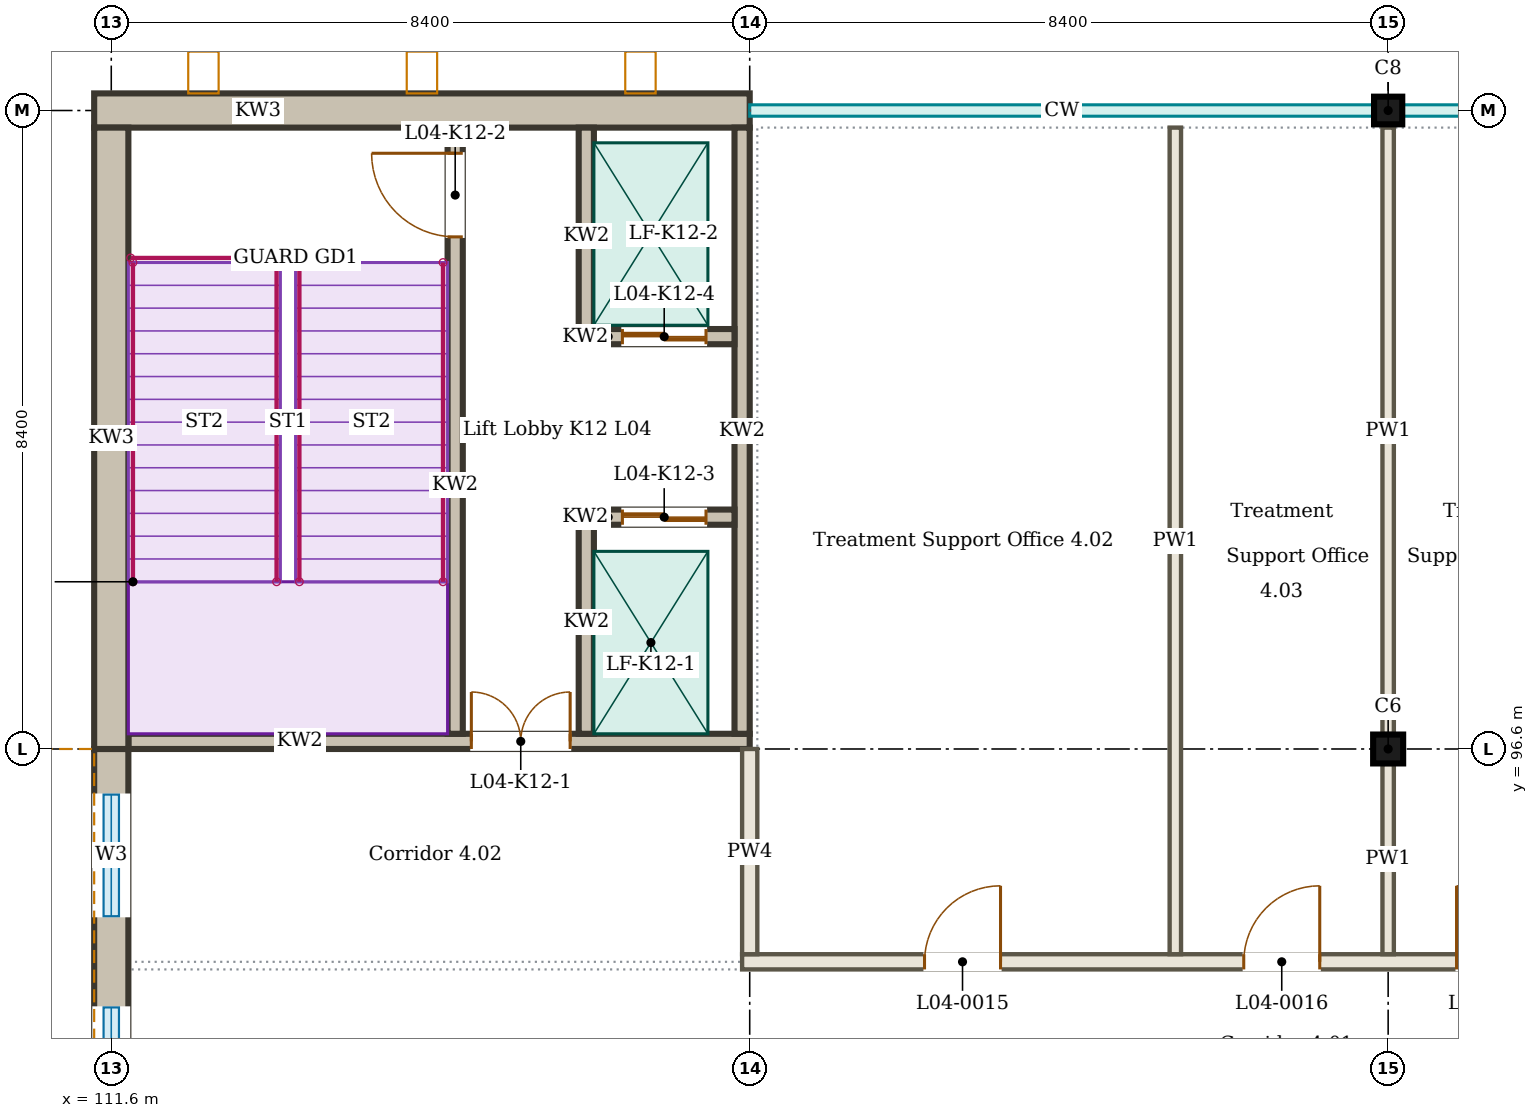
"""IFC4 building model, lengths in metres.
Left out: names, types, materials, properties, quantities, classifications, styles, units other than length and angle.
Written with IfcOpenShell. Run it as: python <this file> out.ifc"""

import sys

from ifc_helpers import new_model, si_unit, direction, frame, frame_2d, origin, origin_2d, place, context, subcontext, project, spatial, rectangle, i_section, extrude, element, fill, save


model = new_model("IFC4")
c1 = context("Model", 3, precision=1e-05, world=origin(), true_north=direction((0.0, 1.0)))
c2 = subcontext(c1, "Body", "Model", "MODEL_VIEW")
j1 = project(units=[si_unit("LENGTHUNIT", "METRE"), si_unit("PLANEANGLEUNIT", "RADIAN")], contexts=[c1])
p1 = place(None, origin())
s1 = spatial("IfcSite", under=j1, at=p1, CompositionType="ELEMENT")
p2 = place(p1, origin())
s2 = spatial("IfcBuilding", under=s1, at=p2, CompositionType="ELEMENT")
p3 = place(p2, frame((0.0, 0.0, 18.0)))
s3 = spatial("IfcBuildingStorey", under=s2, at=p3, CompositionType="ELEMENT", Elevation=18.0)
p4 = place(p3, frame((128.4, 96.6, 0.0), z_axis=(0.0, 0.0, 1.0), x_axis=(1.0, 0.0, 0.0)))
e1 = element("IfcColumn", 1, at=p4, inside=s3, PredefinedType="COLUMN", context=c2, shape_type="SweptSolid", body=[
    extrude(i_section(OverallWidth=0.395, OverallDepth=0.38, WebThickness=0.019, FlangeThickness=0.03, FilletRadius=0.027, at=origin_2d()), origin(), (0.0, 0.0, 1.0), 4.5),
])
p5 = place(p3, frame((128.4, 105.0, 0.0), z_axis=(0.0, 0.0, 1.0), x_axis=(1.0, 0.0, 0.0)))
e2 = element("IfcColumn", 2, at=p5, inside=s3, PredefinedType="COLUMN", context=c2, shape_type="SweptSolid", body=[
    extrude(i_section(OverallWidth=0.371, OverallDepth=0.364, WebThickness=0.013, FlangeThickness=0.022, FilletRadius=0.027, at=origin_2d()), origin(), (0.0, 0.0, 1.0), 4.5),
])
p6 = place(p3, frame((111.6, 88.35, 0.0), z_axis=(0.0, 0.0, 1.0), x_axis=(0.0, 1.0, 0.0)))
e3 = element("IfcWall", 3, at=p6, inside=s3, PredefinedType="SOLIDWALL", context=c2, shape_type="SweptSolid", body=[
    extrude(rectangle(XDim=8.25, YDim=0.45, at=frame_2d((4.125, 0.0))), origin(), (0.0, 0.0, 1.0), 3.8),
])
p7 = place(p6, frame((0.95, 0.0, 2.1)))
e4 = element("IfcOpeningElement", 4, at=p7, cuts=e3, PredefinedType="OPENING", context=c2, shape_type="SweptSolid", body=[
    extrude(rectangle(XDim=0.6, YDim=1.2, at=frame_2d((0.3, 0.6))), frame((0.0, 0.235, 0.0), z_axis=(0.0, -1.0, 0.0), x_axis=(1.0, 0.0, 0.0)), (0.0, 0.0, 1.0), 0.47),
])
p8 = place(p6, frame((3.25, 0.0, 2.7)))
e5 = element("IfcOpeningElement", 5, at=p8, cuts=e3, PredefinedType="OPENING", context=c2, shape_type="SweptSolid", body=[
    extrude(rectangle(XDim=1.6, YDim=0.6, at=frame_2d((0.8, 0.3))), frame((0.0, 0.235, 0.0), z_axis=(0.0, -1.0, 0.0), x_axis=(1.0, 0.0, 0.0)), (0.0, 0.0, 1.0), 0.47),
])
p9 = place(p6, frame((6.05, 0.0, 2.7)))
e6 = element("IfcOpeningElement", 6, at=p9, cuts=e3, PredefinedType="OPENING", context=c2, shape_type="SweptSolid", body=[
    extrude(rectangle(XDim=1.6, YDim=0.6, at=frame_2d((0.8, 0.3))), frame((0.0, 0.235, 0.0), z_axis=(0.0, -1.0, 0.0), x_axis=(1.0, 0.0, 0.0)), (0.0, 0.0, 1.0), 0.47),
])
p10 = place(p3, frame((111.44, 88.35, 3.82), z_axis=(0.0, 0.0, 1.0), x_axis=(0.0, 1.0, 0.0)))
e7 = element("IfcWall", 7, at=p10, inside=s3, PredefinedType="SOLIDWALL", context=c2, shape_type="SweptSolid", body=[
    extrude(rectangle(XDim=8.25, YDim=0.13, at=frame_2d((4.125, 0.0))), origin(), (0.0, 0.0, 1.0), 0.68),
])
p11 = place(p3, frame((119.9, 93.8, 0.0), z_axis=(0.0, 0.0, 1.0), x_axis=(1.0, 0.0, 0.0)))
e8 = element("IfcWall", 8, at=p11, inside=s3, PredefinedType="PARTITIONING", context=c2, shape_type="SweptSolid", body=[
    extrude(rectangle(XDim=22.6, YDim=0.2, at=frame_2d((11.3, 0.0))), origin(), (0.0, 0.0, 1.0), 3.75),
])
p12 = place(p11, frame((2.4, 0.0, 0.0)))
e9 = element("IfcOpeningElement", 9, at=p12, cuts=e8, PredefinedType="OPENING", context=c2, shape_type="SweptSolid", body=[
    extrude(rectangle(XDim=1.0, YDim=2.1, at=frame_2d((0.5, 1.05))), frame((0.0, 0.11, 0.0), z_axis=(0.0, -1.0, 0.0), x_axis=(1.0, 0.0, 0.0)), (0.0, 0.0, 1.0), 0.22),
])
p13 = place(p11, frame((6.6, 0.0, 0.0)))
e10 = element("IfcOpeningElement", 10, at=p13, cuts=e8, PredefinedType="OPENING", context=c2, shape_type="SweptSolid", body=[
    extrude(rectangle(XDim=1.0, YDim=2.1, at=frame_2d((0.5, 1.05))), frame((0.0, 0.11, 0.0), z_axis=(0.0, -1.0, 0.0), x_axis=(1.0, 0.0, 0.0)), (0.0, 0.0, 1.0), 0.22),
])
p14 = place(p11, frame((9.4, 0.0, 0.0)))
e11 = element("IfcOpeningElement", 11, at=p14, cuts=e8, PredefinedType="OPENING", context=c2, shape_type="SweptSolid", body=[
    extrude(rectangle(XDim=1.0, YDim=2.1, at=frame_2d((0.5, 1.05))), frame((0.0, 0.11, 0.0), z_axis=(0.0, -1.0, 0.0), x_axis=(1.0, 0.0, 0.0)), (0.0, 0.0, 1.0), 0.22),
])
p15 = place(p11, frame((13.6, 0.0, 0.0)))
e12 = element("IfcOpeningElement", 12, at=p15, cuts=e8, PredefinedType="OPENING", context=c2, shape_type="SweptSolid", body=[
    extrude(rectangle(XDim=1.0, YDim=2.1, at=frame_2d((0.5, 1.05))), frame((0.0, 0.11, 0.0), z_axis=(0.0, -1.0, 0.0), x_axis=(1.0, 0.0, 0.0)), (0.0, 0.0, 1.0), 0.22),
])
p16 = place(p11, frame((19.2, 0.0, 0.0)))
e13 = element("IfcOpeningElement", 13, at=p16, cuts=e8, PredefinedType="OPENING", context=c2, shape_type="SweptSolid", body=[
    extrude(rectangle(XDim=1.0, YDim=2.1, at=frame_2d((0.5, 1.05))), frame((0.0, 0.11, 0.0), z_axis=(0.0, -1.0, 0.0), x_axis=(1.0, 0.0, 0.0)), (0.0, 0.0, 1.0), 0.22),
])
p17 = place(p3, frame((120.0, 93.9, 0.0), z_axis=(0.0, 0.0, 1.0), x_axis=(0.0, 1.0, 0.0)))
e14 = element("IfcWall", 14, at=p17, inside=s3, PredefinedType="PARTITIONING", context=c2, shape_type="SweptSolid", body=[
    extrude(rectangle(XDim=2.7, YDim=0.2, at=frame_2d((1.35, 0.0))), origin(), (0.0, 0.0, 1.0), 3.75),
])
p18 = place(p3, frame((125.6, 93.9, 0.0), z_axis=(0.0, 0.0, 1.0), x_axis=(0.0, 1.0, 0.0)))
e15 = element("IfcWall", 15, at=p18, inside=s3, PredefinedType="PARTITIONING", context=c2, shape_type="SweptSolid", body=[
    extrude(rectangle(XDim=10.875, YDim=0.15, at=frame_2d((5.438, 0.0))), origin(), (0.0, 0.0, 1.0), 3.75),
])
p19 = place(p3, frame((128.4, 93.9, 0.0), z_axis=(0.0, 0.0, 1.0), x_axis=(0.0, 1.0, 0.0)))
e16 = element("IfcWall", 16, at=p19, inside=s3, PredefinedType="PARTITIONING", context=c2, shape_type="SweptSolid", body=[
    extrude(rectangle(XDim=2.503, YDim=0.15, at=frame_2d((1.251, 0.0))), origin(), (0.0, 0.0, 1.0), 3.75),
])
p20 = place(p3, frame((128.4, 96.798, 0.0), z_axis=(0.0, 0.0, 1.0), x_axis=(0.0, 1.0, 0.0)))
e17 = element("IfcWall", 17, at=p20, inside=s3, PredefinedType="PARTITIONING", context=c2, shape_type="SweptSolid", body=[
    extrude(rectangle(XDim=7.977, YDim=0.15, at=frame_2d((3.989, 0.0))), origin(), (0.0, 0.0, 1.0), 3.75),
])
p21 = place(p3, frame((111.825, 96.7, 0.0), z_axis=(0.0, 0.0, 1.0), x_axis=(1.0, 0.0, 0.0)))
e18 = element("IfcWall", 18, at=p21, inside=s3, PredefinedType="SOLIDWALL", context=c2, shape_type="SweptSolid", body=[
    extrude(rectangle(XDim=8.175, YDim=0.2, at=frame_2d((4.087, 0.0))), origin(), (0.0, 0.0, 1.0), 4.5),
])
p22 = place(p21, frame((4.512, 0.0, 0.0)))
e19 = element("IfcOpeningElement", 19, at=p22, cuts=e18, PredefinedType="OPENING", context=c2, shape_type="SweptSolid", body=[
    extrude(rectangle(XDim=1.3, YDim=2.1, at=frame_2d((0.65, 1.05))), frame((0.0, 0.11, 0.0), z_axis=(0.0, -1.0, 0.0), x_axis=(1.0, 0.0, 0.0)), (0.0, 0.0, 1.0), 0.22),
])
p23 = place(p3, frame((111.375, 105.0, 0.0), z_axis=(0.0, 0.0, 1.0), x_axis=(1.0, 0.0, 0.0)))
e20 = element("IfcWall", 20, at=p23, inside=s3, PredefinedType="SOLIDWALL", context=c2, shape_type="SweptSolid", body=[
    extrude(rectangle(XDim=8.625, YDim=0.45, at=frame_2d((4.312, 0.0))), origin(), (0.0, 0.0, 1.0), 4.5),
])
p24 = place(p3, frame((111.6, 96.6, 0.0), z_axis=(0.0, 0.0, 1.0), x_axis=(0.0, 1.0, 0.0)))
e21 = element("IfcWall", 21, at=p24, inside=s3, PredefinedType="SOLIDWALL", context=c2, shape_type="SweptSolid", body=[
    extrude(rectangle(XDim=8.175, YDim=0.45, at=frame_2d((4.087, 0.0))), origin(), (0.0, 0.0, 1.0), 4.5),
])
p25 = place(p3, frame((119.9, 96.8, 0.0), z_axis=(0.0, 0.0, 1.0), x_axis=(0.0, 1.0, 0.0)))
e22 = element("IfcWall", 22, at=p25, inside=s3, PredefinedType="SOLIDWALL", context=c2, shape_type="SweptSolid", body=[
    extrude(rectangle(XDim=7.975, YDim=0.2, at=frame_2d((3.987, 0.0))), origin(), (0.0, 0.0, 1.0), 4.5),
])
p26 = place(p3, frame((116.125, 96.8, 0.0), z_axis=(0.0, 0.0, 1.0), x_axis=(0.0, 1.0, 0.0)))
e23 = element("IfcWall", 23, at=p26, inside=s3, PredefinedType="SOLIDWALL", context=c2, shape_type="SweptSolid", body=[
    extrude(rectangle(XDim=7.975, YDim=0.2, at=frame_2d((3.987, 0.0))), origin(), (0.0, 0.0, 1.0), 4.5),
])
p27 = place(p26, frame((6.538, 0.0, 0.0)))
e24 = element("IfcOpeningElement", 24, at=p27, cuts=e23, PredefinedType="OPENING", context=c2, shape_type="SweptSolid", body=[
    extrude(rectangle(XDim=1.1, YDim=2.1, at=frame_2d((0.55, 1.05))), frame((0.0, 0.11, 0.0), z_axis=(0.0, -1.0, 0.0), x_axis=(1.0, 0.0, 0.0)), (0.0, 0.0, 1.0), 0.22),
])
p28 = place(p3, frame((117.85, 96.8, 0.0), z_axis=(0.0, 0.0, 1.0), x_axis=(0.0, 1.0, 0.0)))
e25 = element("IfcWall", 25, at=p28, inside=s3, PredefinedType="SOLIDWALL", context=c2, shape_type="SweptSolid", body=[
    extrude(rectangle(XDim=2.95, YDim=0.2, at=frame_2d((1.475, 0.0))), origin(), (0.0, 0.0, 1.0), 4.5),
])
p29 = place(p3, frame((117.85, 101.925, 0.0), z_axis=(0.0, 0.0, 1.0), x_axis=(0.0, 1.0, 0.0)))
e26 = element("IfcWall", 26, at=p29, inside=s3, PredefinedType="SOLIDWALL", context=c2, shape_type="SweptSolid", body=[
    extrude(rectangle(XDim=2.85, YDim=0.2, at=frame_2d((1.425, 0.0))), origin(), (0.0, 0.0, 1.0), 4.5),
])
p30 = place(p3, frame((117.95, 99.65, 0.0), z_axis=(0.0, 0.0, 1.0), x_axis=(1.0, 0.0, 0.0)))
e27 = element("IfcWall", 27, at=p30, inside=s3, PredefinedType="SOLIDWALL", context=c2, shape_type="SweptSolid", body=[
    extrude(rectangle(XDim=1.85, YDim=0.2, at=frame_2d((0.925, 0.0))), origin(), (0.0, 0.0, 1.0), 4.5),
])
p31 = place(p30, frame((0.375, 0.0, 0.0)))
e28 = element("IfcOpeningElement", 28, at=p31, cuts=e27, PredefinedType="OPENING", context=c2, shape_type="SweptSolid", body=[
    extrude(rectangle(XDim=1.1, YDim=2.1, at=frame_2d((0.55, 1.05))), frame((0.0, 0.11, 0.0), z_axis=(0.0, -1.0, 0.0), x_axis=(1.0, 0.0, 0.0)), (0.0, 0.0, 1.0), 0.22),
])
p32 = place(p3, frame((117.95, 102.025, 0.0), z_axis=(0.0, 0.0, 1.0), x_axis=(1.0, 0.0, 0.0)))
e29 = element("IfcWall", 29, at=p32, inside=s3, PredefinedType="SOLIDWALL", context=c2, shape_type="SweptSolid", body=[
    extrude(rectangle(XDim=1.85, YDim=0.2, at=frame_2d((0.925, 0.0))), origin(), (0.0, 0.0, 1.0), 4.5),
])
p33 = place(p32, frame((0.375, 0.0, 0.0)))
e30 = element("IfcOpeningElement", 30, at=p33, cuts=e29, PredefinedType="OPENING", context=c2, shape_type="SweptSolid", body=[
    extrude(rectangle(XDim=1.1, YDim=2.1, at=frame_2d((0.55, 1.05))), frame((0.0, 0.11, 0.0), z_axis=(0.0, -1.0, 0.0), x_axis=(1.0, 0.0, 0.0)), (0.0, 0.0, 1.0), 0.22),
])
p34 = place(p8, origin())
e31 = element("IfcWindow", 31, at=p34, inside=s3, PartitioningType="SINGLE_PANEL", PredefinedType="WINDOW", context=c2, shape_type="SweptSolid", body=[
    extrude(rectangle(XDim=1.6, YDim=0.6, at=frame_2d((0.8, 0.3))), frame((0.0, 0.03, 0.0), z_axis=(0.0, -1.0, 0.0), x_axis=(1.0, 0.0, 0.0)), (0.0, 0.0, 1.0), 0.06),
])
fill(e5, e31)
p35 = place(p9, origin())
e32 = element("IfcWindow", 32, at=p35, inside=s3, PartitioningType="SINGLE_PANEL", PredefinedType="WINDOW", context=c2, shape_type="SweptSolid", body=[
    extrude(rectangle(XDim=1.6, YDim=0.6, at=frame_2d((0.8, 0.3))), frame((0.0, 0.03, 0.0), z_axis=(0.0, -1.0, 0.0), x_axis=(1.0, 0.0, 0.0)), (0.0, 0.0, 1.0), 0.06),
])
fill(e6, e32)
p36 = place(p12, origin())
e33 = element("IfcDoor", 33, at=p36, inside=s3, OperationType="SINGLE_SWING_RIGHT", PredefinedType="DOOR", context=c2, shape_type="SweptSolid", body=[
    extrude(rectangle(XDim=1.0, YDim=2.1, at=frame_2d((0.5, 1.05))), frame((0.0, 0.025, 0.0), z_axis=(0.0, -1.0, 0.0), x_axis=(1.0, 0.0, 0.0)), (0.0, 0.0, 1.0), 0.05),
])
fill(e9, e33)
p37 = place(p13, origin())
e34 = element("IfcDoor", 34, at=p37, inside=s3, OperationType="SINGLE_SWING_RIGHT", PredefinedType="DOOR", context=c2, shape_type="SweptSolid", body=[
    extrude(rectangle(XDim=1.0, YDim=2.1, at=frame_2d((0.5, 1.05))), frame((0.0, 0.025, 0.0), z_axis=(0.0, -1.0, 0.0), x_axis=(1.0, 0.0, 0.0)), (0.0, 0.0, 1.0), 0.05),
])
fill(e10, e34)
p38 = place(p14, origin())
e35 = element("IfcDoor", 35, at=p38, inside=s3, OperationType="SINGLE_SWING_LEFT", PredefinedType="DOOR", context=c2, shape_type="SweptSolid", body=[
    extrude(rectangle(XDim=1.0, YDim=2.1, at=frame_2d((0.5, 1.05))), frame((0.0, 0.025, 0.0), z_axis=(0.0, -1.0, 0.0), x_axis=(1.0, 0.0, 0.0)), (0.0, 0.0, 1.0), 0.05),
])
fill(e11, e35)
p39 = place(p22, origin())
e36 = element("IfcDoor", 36, at=p39, inside=s3, OperationType="DOUBLE_DOOR_DOUBLE_SWING", PredefinedType="DOOR", context=c2, shape_type="SweptSolid", body=[
    extrude(rectangle(XDim=1.3, YDim=2.1, at=frame_2d((0.65, 1.05))), frame((0.0, 0.025, 0.0), z_axis=(0.0, -1.0, 0.0), x_axis=(1.0, 0.0, 0.0)), (0.0, 0.0, 1.0), 0.05),
])
fill(e19, e36)
p40 = place(p27, origin())
e37 = element("IfcDoor", 37, at=p40, inside=s3, OperationType="SINGLE_SWING_RIGHT", PredefinedType="DOOR", context=c2, shape_type="SweptSolid", body=[
    extrude(rectangle(XDim=1.1, YDim=2.1, at=frame_2d((0.55, 1.05))), frame((0.0, 0.025, 0.0), z_axis=(0.0, -1.0, 0.0), x_axis=(1.0, 0.0, 0.0)), (0.0, 0.0, 1.0), 0.05),
])
fill(e24, e37)
p41 = place(p31, origin())
e38 = element("IfcDoor", 38, at=p41, inside=s3, OperationType="DOUBLE_DOOR_SLIDING", PredefinedType="DOOR", context=c2, shape_type="SweptSolid", body=[
    extrude(rectangle(XDim=1.1, YDim=2.1, at=frame_2d((0.55, 1.05))), frame((0.0, 0.025, 0.0), z_axis=(0.0, -1.0, 0.0), x_axis=(1.0, 0.0, 0.0)), (0.0, 0.0, 1.0), 0.05),
])
fill(e28, e38)
p42 = place(p33, origin())
e39 = element("IfcDoor", 39, at=p42, inside=s3, OperationType="DOUBLE_DOOR_SLIDING", PredefinedType="DOOR", context=c2, shape_type="SweptSolid", body=[
    extrude(rectangle(XDim=1.1, YDim=2.1, at=frame_2d((0.55, 1.05))), frame((0.0, 0.025, 0.0), z_axis=(0.0, -1.0, 0.0), x_axis=(1.0, 0.0, 0.0)), (0.0, 0.0, 1.0), 0.05),
])
fill(e30, e39)
save(model, sys.argv[1])
